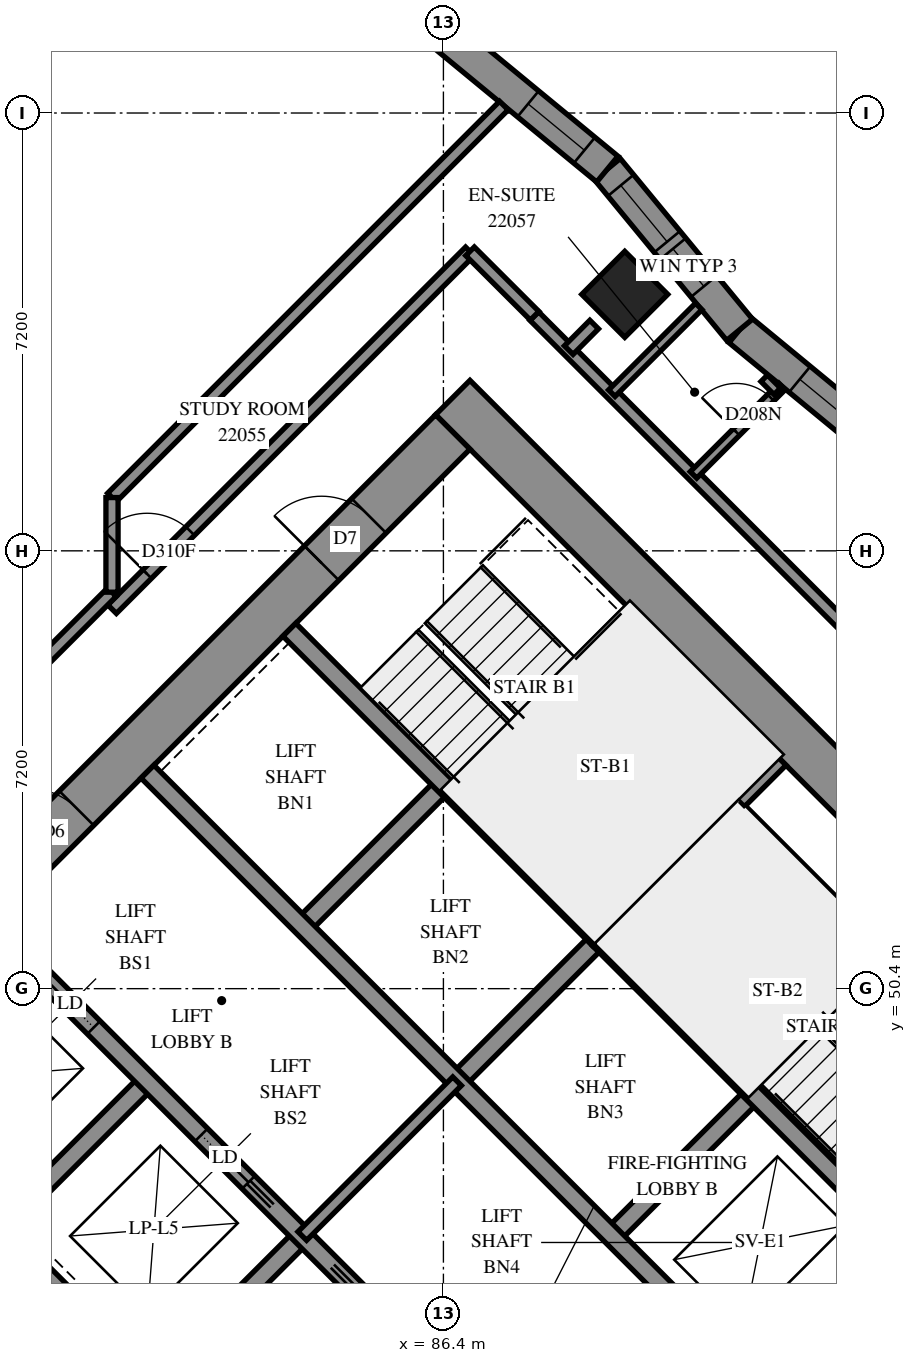
"""IFC4 building model, lengths in metres.
Left out: names, types, materials, properties, quantities, classifications, styles, units other than length and angle.
Written with IfcOpenShell. Run it as: python <this file> out.ifc"""

import sys

from ifc_helpers import new_model, si_unit, direction, frame, frame_2d, origin, origin_2d, place, context, subcontext, project, spatial, polyline, rectangle, outline, extrude, element, fill, save


model = new_model("IFC4")
c1 = context("Model", 3, precision=1e-05, world=origin(), true_north=direction((0.0, 1.0)))
c2 = subcontext(c1, "Body", "Model", "MODEL_VIEW")
j1 = project(units=[si_unit("LENGTHUNIT", "METRE"), si_unit("PLANEANGLEUNIT", "RADIAN")], contexts=[c1])
p1 = place(None, origin())
s1 = spatial("IfcSite", under=j1, at=p1, CompositionType="ELEMENT")
p2 = place(p1, origin())
s2 = spatial("IfcBuilding", under=s1, at=p2, CompositionType="ELEMENT")
p3 = place(p2, frame((0.0, 0.0, 84.6)))
s3 = spatial("IfcBuildingStorey", under=s2, at=p3, CompositionType="ELEMENT", Elevation=84.6)
p4 = place(p3, frame((89.382, 61.818, 0.0), z_axis=(0.0, 0.0, 1.0), x_axis=(0.7071067812, -0.7071067812, 0.0)))
e1 = element("IfcColumn", 1, at=p4, inside=s3, PredefinedType="COLUMN", context=c2, shape_type="SweptSolid", body=[
    extrude(rectangle(XDim=1.0, YDim=1.0, at=origin_2d()), origin(), (0.0, 0.0, 1.0), 3.1),
])
p5 = place(p3, frame((75.806, 49.373, -0.3), z_axis=(0.0, 0.0, 1.0), x_axis=(0.7071067812, -0.7071067812, 0.0)))
e2 = element("IfcWall", 2, at=p5, inside=s3, PredefinedType="SHEAR", context=c2, shape_type="SweptSolid", body=[
    extrude(rectangle(XDim=16.0, YDim=0.8, at=frame_2d((8.0, 0.0))), origin(), (0.0, 0.0, 1.0), 2.7),
])
p6 = place(p3, frame((86.554, 60.121, -0.3), z_axis=(0.0, 0.0, 1.0), x_axis=(0.7071067812, -0.7071067812, 0.0)))
e3 = element("IfcWall", 3, at=p6, inside=s3, PredefinedType="SHEAR", context=c2, shape_type="SweptSolid", body=[
    extrude(rectangle(XDim=16.0, YDim=0.8, at=frame_2d((8.0, 0.0))), origin(), (0.0, 0.0, 1.0), 2.7),
])
p7 = place(p6, frame((10.8, 0.0, 0.3)))
e4 = element("IfcOpeningElement", 4, at=p7, cuts=e3, PredefinedType="OPENING", context=c2, shape_type="SweptSolid", body=[
    extrude(rectangle(XDim=0.8, YDim=2.1, at=frame_2d((0.4, 1.05))), frame((0.0, 0.41, 0.0), z_axis=(0.0, -1.0, 0.0), x_axis=(1.0, 0.0, 0.0)), (0.0, 0.0, 1.0), 0.82),
])
p8 = place(p3, frame((76.372, 49.373, -0.3), z_axis=(0.0, 0.0, 1.0), x_axis=(0.7071067812, 0.7071067812, 0.0)))
e5 = element("IfcWall", 5, at=p8, inside=s3, PredefinedType="SHEAR", context=c2, shape_type="SweptSolid", body=[
    extrude(rectangle(XDim=14.4, YDim=0.8, at=frame_2d((7.2, 0.0))), origin(), (0.0, 0.0, 1.0), 2.7),
])
p9 = place(p8, frame((4.55, 0.0, 0.3)))
e6 = element("IfcOpeningElement", 6, at=p9, cuts=e5, PredefinedType="OPENING", context=c2, shape_type="SweptSolid", body=[
    extrude(rectangle(XDim=1.1, YDim=2.1, at=frame_2d((0.55, 1.05))), frame((0.0, 0.41, 0.0), z_axis=(0.0, -1.0, 0.0), x_axis=(1.0, 0.0, 0.0)), (0.0, 0.0, 1.0), 0.82),
])
p10 = place(p8, frame((11.35, 0.0, 0.3)))
e7 = element("IfcOpeningElement", 7, at=p10, cuts=e5, PredefinedType="OPENING", context=c2, shape_type="SweptSolid", body=[
    extrude(rectangle(XDim=1.1, YDim=2.1, at=frame_2d((0.55, 1.05))), frame((0.0, 0.41, 0.0), z_axis=(0.0, -1.0, 0.0), x_axis=(1.0, 0.0, 0.0)), (0.0, 0.0, 1.0), 0.82),
])
p11 = place(p3, frame((87.12, 38.625, -0.3), z_axis=(0.0, 0.0, 1.0), x_axis=(0.7071067812, 0.7071067812, 0.0)))
e8 = element("IfcWall", 8, at=p11, inside=s3, PredefinedType="SHEAR", context=c2, shape_type="SweptSolid", body=[
    extrude(rectangle(XDim=14.4, YDim=0.8, at=frame_2d((7.2, 0.0))), origin(), (0.0, 0.0, 1.0), 2.7),
])
p12 = place(p11, frame((4.55, 0.0, 0.3)))
e9 = element("IfcOpeningElement", 9, at=p12, cuts=e8, PredefinedType="OPENING", context=c2, shape_type="SweptSolid", body=[
    extrude(rectangle(XDim=1.1, YDim=2.1, at=frame_2d((0.55, 1.05))), frame((0.0, 0.41, 0.0), z_axis=(0.0, -1.0, 0.0), x_axis=(1.0, 0.0, 0.0)), (0.0, 0.0, 1.0), 0.82),
])
p13 = place(p11, frame((11.35, 0.0, 0.3)))
e10 = element("IfcOpeningElement", 10, at=p13, cuts=e8, PredefinedType="OPENING", context=c2, shape_type="SweptSolid", body=[
    extrude(rectangle(XDim=1.1, YDim=2.1, at=frame_2d((0.55, 1.05))), frame((0.0, 0.41, 0.0), z_axis=(0.0, -1.0, 0.0), x_axis=(1.0, 0.0, 0.0)), (0.0, 0.0, 1.0), 0.82),
])
for number, where, z_axis, x_axis in (
    (11, (79.2, 46.544, 0.0), (0.0, 0.0, 1.0), (0.707, 0.707, 0.0)),
    (12, (84.079, 51.423, 0.0), (0.0, 0.0, 1.0), (0.707, 0.707, 0.0)),
):
    element("IfcWall", number, at=place(p3, frame(where, z_axis=z_axis, x_axis=x_axis)), inside=s3, PredefinedType="SOLIDWALL", context=c2, shape_type="SweptSolid", body=[
        extrude(rectangle(XDim=3.3, YDim=0.3, at=frame_2d((1.65, 0.0))), origin(), (0.0, 0.0, 1.0), 3.1),
    ])
p14 = place(p3, frame((81.746, 43.999, 0.0), z_axis=(0.0, 0.0, 1.0), x_axis=(0.7071067812, 0.7071067812, 0.0)))
e13 = element("IfcWall", 13, at=p14, inside=s3, PredefinedType="SOLIDWALL", context=c2, shape_type="SweptSolid", body=[
    extrude(rectangle(XDim=3.3, YDim=0.3, at=frame_2d((1.65, 0.0))), origin(), (0.0, 0.0, 1.0), 3.1),
])
for number, where, z_axis, x_axis in (
    (14, (86.625, 48.878, 0.0), (0.0, 0.0, 1.0), (0.707, 0.707, 0.0)),
    (15, (89.17, 46.332, 0.0), (0.0, 0.0, 1.0), (0.707, 0.707, 0.0)),
):
    element("IfcWall", number, at=place(p3, frame(where, z_axis=z_axis, x_axis=x_axis)), inside=s3, PredefinedType="SOLIDWALL", context=c2, shape_type="SweptSolid", body=[
        extrude(rectangle(XDim=3.3, YDim=0.3, at=frame_2d((1.65, 0.0))), origin(), (0.0, 0.0, 1.0), 3.1),
    ])
p15 = place(p3, frame((78.988, 51.423, 0.0), z_axis=(0.0, 0.0, 1.0), x_axis=(0.7071067812, -0.7071067812, 0.0)))
e16 = element("IfcWall", 16, at=p15, inside=s3, PredefinedType="SOLIDWALL", context=c2, shape_type="SweptSolid", body=[
    extrude(rectangle(XDim=14.4, YDim=0.3, at=frame_2d((7.2, 0.0))), origin(), (0.0, 0.0, 1.0), 3.1),
])
p16 = place(p15, frame((1.25, 0.0, 0.0)))
e17 = element("IfcOpeningElement", 17, at=p16, cuts=e16, PredefinedType="OPENING", context=c2, shape_type="SweptSolid", body=[
    extrude(rectangle(XDim=1.1, YDim=2.1, at=frame_2d((0.55, 1.05))), frame((0.0, 0.16, 0.0), z_axis=(0.0, -1.0, 0.0), x_axis=(1.0, 0.0, 0.0)), (0.0, 0.0, 1.0), 0.32),
])
p17 = place(p15, frame((4.85, 0.0, 0.0)))
e18 = element("IfcOpeningElement", 18, at=p17, cuts=e16, PredefinedType="OPENING", context=c2, shape_type="SweptSolid", body=[
    extrude(rectangle(XDim=1.1, YDim=2.1, at=frame_2d((0.55, 1.05))), frame((0.0, 0.16, 0.0), z_axis=(0.0, -1.0, 0.0), x_axis=(1.0, 0.0, 0.0)), (0.0, 0.0, 1.0), 0.32),
])
p18 = place(p15, frame((8.45, 0.0, 0.0)))
e19 = element("IfcOpeningElement", 19, at=p18, cuts=e16, PredefinedType="OPENING", context=c2, shape_type="SweptSolid", body=[
    extrude(rectangle(XDim=1.1, YDim=2.1, at=frame_2d((0.55, 1.05))), frame((0.0, 0.16, 0.0), z_axis=(0.0, -1.0, 0.0), x_axis=(1.0, 0.0, 0.0)), (0.0, 0.0, 1.0), 0.32),
])
p19 = place(p15, frame((12.05, 0.0, 0.0)))
e20 = element("IfcOpeningElement", 20, at=p19, cuts=e16, PredefinedType="OPENING", context=c2, shape_type="SweptSolid", body=[
    extrude(rectangle(XDim=1.1, YDim=2.1, at=frame_2d((0.55, 1.05))), frame((0.0, 0.16, 0.0), z_axis=(0.0, -1.0, 0.0), x_axis=(1.0, 0.0, 0.0)), (0.0, 0.0, 1.0), 0.32),
])
p20 = place(p3, frame((81.534, 53.969, 0.0), z_axis=(0.0, 0.0, 1.0), x_axis=(0.707103309, -0.7071102534, 0.0)))
e21 = element("IfcWall", 21, at=p20, inside=s3, PredefinedType="SOLIDWALL", context=c2, shape_type="SweptSolid", body=[
    extrude(rectangle(XDim=14.4, YDim=0.3, at=frame_2d((7.2, 0.0))), origin(), (0.0, 0.0, 1.0), 3.1),
])
p21 = place(p20, frame((12.05, 0.0, 0.0)))
e22 = element("IfcOpeningElement", 22, at=p21, cuts=e21, PredefinedType="OPENING", context=c2, shape_type="SweptSolid", body=[
    extrude(rectangle(XDim=1.1, YDim=2.1, at=frame_2d((0.55, 1.05))), frame((0.0, 0.16, 0.0), z_axis=(0.0, -1.0, 0.0), x_axis=(1.0, 0.0, 0.0)), (0.0, 0.0, 1.0), 0.32),
])
for number, where, z_axis, x_axis in (
    (23, (83.867, 56.302, 0.0), (0.0, 0.0, 1.0), (0.707, -0.707, 0.0)),
    (24, (88.958, 51.211, 0.0), (0.0, 0.0, 1.0), (0.707, -0.707, 0.0)),
):
    element("IfcWall", number, at=place(p3, frame(where, z_axis=z_axis, x_axis=x_axis)), inside=s3, PredefinedType="SOLIDWALL", context=c2, shape_type="SweptSolid", body=[
        extrude(rectangle(XDim=7.2, YDim=0.3, at=frame_2d((3.6, 0.0))), origin(), (0.0, 0.0, 1.0), 3.1),
    ])
p22 = place(p3, frame((88.958, 51.211, 0.0), z_axis=(0.0, 0.0, 1.0), x_axis=(0.7071067812, 0.7071067812, 0.0)))
e25 = element("IfcWall", 25, at=p22, inside=s3, PredefinedType="SOLIDWALL", context=c2, shape_type="SweptSolid", body=[
    extrude(rectangle(XDim=4.2, YDim=0.3, at=frame_2d((2.1, 0.0))), origin(), (0.0, 0.0, 1.0), 3.1),
])
p23 = place(p3, frame((93.913, 59.06, 0.0), z_axis=(0.0, 0.0, 1.0), x_axis=(-0.7720044648, 0.6356171067, 0.0)))
e26 = element("IfcWall", 26, at=p23, inside=s3, PredefinedType="SOLIDWALL", context=c2, shape_type="SweptSolid", body=[
    extrude(outline(polyline([(-0.027, -0.275), (3.395, -0.275), (3.449, 0.275), (0.027, 0.275), (-0.027, -0.275)])), origin(), (0.0, 0.0, 1.0), 3.1),
])
p24 = place(p23, frame((0.941, 0.0, 0.5)))
e27 = element("IfcOpeningElement", 27, at=p24, cuts=e26, PredefinedType="OPENING", context=c2, shape_type="SweptSolid", body=[
    extrude(rectangle(XDim=1.2, YDim=2.45, at=frame_2d((0.6, 1.225))), frame((0.0, 0.285, 0.0), z_axis=(0.0, -1.0, 0.0), x_axis=(1.0, 0.0, 0.0)), (0.0, 0.0, 1.0), 0.57),
])
p25 = place(p3, frame((91.271, 61.235, 0.0), z_axis=(0.0, 0.0, 1.0), x_axis=(-0.6356171067, 0.7720044648, 0.0)))
e28 = element("IfcWall", 28, at=p25, inside=s3, PredefinedType="SOLIDWALL", context=c2, shape_type="SweptSolid", body=[
    extrude(outline(polyline([(0.027, -0.275), (3.449, -0.275), (3.395, 0.275), (-0.027, 0.275), (0.027, -0.275)])), origin(), (0.0, 0.0, 1.0), 3.1),
])
p26 = place(p25, frame((1.875, 0.0, 0.5)))
e29 = element("IfcOpeningElement", 29, at=p26, cuts=e28, PredefinedType="OPENING", context=c2, shape_type="SweptSolid", body=[
    extrude(rectangle(XDim=1.2, YDim=2.45, at=frame_2d((0.6, 1.225))), frame((0.0, 0.285, 0.0), z_axis=(0.0, -1.0, 0.0), x_axis=(1.0, 0.0, 0.0)), (0.0, 0.0, 1.0), 0.57),
])
p27 = place(p25, frame((0.925, 0.0, 0.45)))
e30 = element("IfcOpeningElement", 30, at=p27, cuts=e28, PredefinedType="OPENING", context=c2, shape_type="SweptSolid", body=[
    extrude(rectangle(XDim=0.8, YDim=2.5, at=frame_2d((0.4, 1.25))), frame((0.0, 0.285, 0.0), z_axis=(0.0, -1.0, 0.0), x_axis=(1.0, 0.0, 0.0)), (0.0, 0.0, 1.0), 0.57),
])
p28 = place(p3, frame((89.096, 63.877, 0.0), z_axis=(0.0, 0.0, 1.0), x_axis=(-0.7719926577, 0.635631447, 0.0)))
e31 = element("IfcWall", 31, at=p28, inside=s3, PredefinedType="SOLIDWALL", context=c2, shape_type="SweptSolid", body=[
    extrude(outline(polyline([(-0.027, -0.275), (3.395, -0.275), (3.449, 0.275), (0.027, 0.275), (-0.027, -0.275)])), origin(), (0.0, 0.0, 1.0), 3.1),
])
p29 = place(p28, frame((0.488, 0.0, 0.5)))
e32 = element("IfcOpeningElement", 32, at=p29, cuts=e31, PredefinedType="OPENING", context=c2, shape_type="SweptSolid", body=[
    extrude(rectangle(XDim=1.2, YDim=2.45, at=frame_2d((0.6, 1.225))), frame((0.0, 0.285, 0.0), z_axis=(0.0, -1.0, 0.0), x_axis=(1.0, 0.0, 0.0)), (0.0, 0.0, 1.0), 0.57),
])
p30 = place(p3, frame((91.313, 53.354, 0.0), z_axis=(0.0, 0.0, 1.0), x_axis=(0.7071140275, -0.7070995348, 0.0)))
e33 = element("IfcWall", 33, at=p30, inside=s3, PredefinedType="PARTITIONING", context=c2, shape_type="SweptSolid", body=[
    extrude(rectangle(XDim=6.9, YDim=0.15, at=frame_2d((3.45, 0.0))), origin(), (0.0, 0.0, 1.0), 3.1),
])
p31 = place(p3, frame((84.079, 46.332, 0.0), z_axis=(0.0, 0.0, 1.0), x_axis=(0.7071067812, 0.7071067812, 0.0)))
e34 = element("IfcWall", 34, at=p31, inside=s3, PredefinedType="PARTITIONING", context=c2, shape_type="SweptSolid", body=[
    extrude(rectangle(XDim=3.6, YDim=0.2, at=frame_2d((1.8, 0.0))), origin(), (0.0, 0.0, 1.0), 3.1),
])
p32 = place(p3, frame((87.894, 61.461, 0.0), z_axis=(0.0, 0.0, 1.0), x_axis=(0.7071067812, -0.7071067812, 0.0)))
e35 = element("IfcWall", 35, at=p32, inside=s3, PredefinedType="PARTITIONING", context=c2, shape_type="SweptSolid", body=[
    extrude(rectangle(XDim=17.5, YDim=0.2, at=frame_2d((8.75, 0.0))), origin(), (0.0, 0.0, 1.0), 3.1),
])
p33 = place(p32, frame((8.735, 0.0, 0.0)))
e36 = element("IfcOpeningElement", 36, at=p33, cuts=e35, PredefinedType="OPENING", context=c2, shape_type="SweptSolid", body=[
    extrude(rectangle(XDim=0.9, YDim=2.1, at=frame_2d((0.45, 1.05))), frame((0.0, 0.11, 0.0), z_axis=(0.0, -1.0, 0.0), x_axis=(1.0, 0.0, 0.0)), (0.0, 0.0, 1.0), 0.22),
])
p34 = place(p3, frame((80.949, 58.477, 0.0), z_axis=(0.0, 0.0, 1.0), x_axis=(0.7071122668, 0.7071012955, 0.0)))
e37 = element("IfcWall", 37, at=p34, inside=s3, PredefinedType="PARTITIONING", context=c2, shape_type="SweptSolid", body=[
    extrude(rectangle(XDim=9.115, YDim=0.2, at=frame_2d((4.557, 0.0))), origin(), (0.0, 0.0, 1.0), 3.1),
])
p35 = place(p3, frame((80.951, 56.641, 0.0), z_axis=(0.0, 0.0, 1.0), x_axis=(0.7071067812, 0.7071067812, 0.0)))
e38 = element("IfcWall", 38, at=p35, inside=s3, PredefinedType="PARTITIONING", context=c2, shape_type="SweptSolid", body=[
    extrude(rectangle(XDim=8.321, YDim=0.2, at=frame_2d((4.161, 0.0))), origin(), (0.0, 0.0, 1.0), 3.1),
])
p36 = place(p35, frame((0.816, 0.0, 0.0)))
e39 = element("IfcOpeningElement", 39, at=p36, cuts=e38, PredefinedType="OPENING", context=c2, shape_type="SweptSolid", body=[
    extrude(rectangle(XDim=1.0, YDim=2.1, at=frame_2d((0.5, 1.05))), frame((0.0, 0.11, 0.0), z_axis=(0.0, -1.0, 0.0), x_axis=(1.0, 0.0, 0.0)), (0.0, 0.0, 1.0), 0.22),
])
p37 = place(p3, frame((90.513, 58.849, 0.0), z_axis=(0.0, 0.0, 1.0), x_axis=(0.7071067812, 0.7071067812, 0.0)))
e40 = element("IfcWall", 40, at=p37, inside=s3, PredefinedType="PARTITIONING", context=c2, shape_type="SweptSolid", body=[
    extrude(rectangle(XDim=2.059, YDim=0.15, at=frame_2d((1.029, 0.0))), origin(), (0.0, 0.0, 1.0), 3.1),
])
p38 = place(p37, frame((0.996, 0.0, 0.0)))
e41 = element("IfcOpeningElement", 41, at=p38, cuts=e40, PredefinedType="OPENING", context=c2, shape_type="SweptSolid", body=[
    extrude(rectangle(XDim=0.8, YDim=2.1, at=frame_2d((0.4, 1.05))), frame((0.0, 0.085, 0.0), z_axis=(0.0, -1.0, 0.0), x_axis=(1.0, 0.0, 0.0)), (0.0, 0.0, 1.0), 0.17),
])
p39 = place(p3, frame((89.169, 60.193, 0.0), z_axis=(0.0, 0.0, 1.0), x_axis=(0.7076512613, 0.7065618815, 0.0)))
e42 = element("IfcWall", 42, at=p39, inside=s3, PredefinedType="PARTITIONING", context=c2, shape_type="SweptSolid", body=[
    extrude(rectangle(XDim=2.019, YDim=0.15, at=frame_2d((1.01, 0.0))), origin(), (0.0, 0.0, 1.0), 3.1),
])
p40 = place(p3, frame((79.801, 55.773, 0.0), z_axis=(0.0, 0.0, 1.0), x_axis=(0.7071067812, 0.7071067812, 0.0)))
e43 = element("IfcWall", 43, at=p40, inside=s3, PredefinedType="PARTITIONING", context=c2, shape_type="SweptSolid", body=[
    extrude(rectangle(XDim=1.623, YDim=0.2, at=frame_2d((0.812, 0.0))), origin(), (0.0, 0.0, 1.0), 3.1),
])
p41 = place(p3, frame((80.95, 56.92, 0.0), z_axis=(0.0, 0.0, 1.0), x_axis=(0.0, 1.0, 0.0)))
e44 = element("IfcWall", 44, at=p41, inside=s3, PredefinedType="PARTITIONING", context=c2, shape_type="SweptSolid", body=[
    extrude(rectangle(XDim=1.556, YDim=0.2, at=frame_2d((0.778, 0.0))), origin(), (0.0, 0.0, 1.0), 3.1),
])
p42 = place(p3, frame((86.838, 62.526, 0.0), z_axis=(0.0, 0.0, 1.0), x_axis=(0.70777292, -0.7064400143, 0.0)))
e45 = element("IfcWall", 45, at=p42, inside=s3, PredefinedType="PARTITIONING", context=c2, shape_type="SweptSolid", body=[
    extrude(rectangle(XDim=1.5, YDim=0.2, at=frame_2d((0.75, 0.0))), origin(), (0.0, 0.0, 1.0), 3.1),
])
p43 = place(p3, frame((88.461, 60.901, 0.0), z_axis=(0.0, 0.0, 1.0), x_axis=(0.7054171665, 0.7087923682, 0.0)))
e46 = element("IfcWall", 46, at=p43, inside=s3, PredefinedType="PARTITIONING", context=c2, shape_type="SweptSolid", body=[
    extrude(rectangle(XDim=0.593, YDim=0.2, at=frame_2d((0.296, 0.0))), origin(), (0.0, 0.0, 1.0), 3.1),
])
p44 = place(p3, frame((91.675, 60.437, 0.0), z_axis=(0.0, 0.0, 1.0), x_axis=(0.7071067812, -0.7071067812, 0.0)))
e47 = element("IfcWall", 47, at=p44, inside=s3, PredefinedType="PARTITIONING", context=c2, shape_type="SweptSolid", body=[
    extrude(rectangle(XDim=0.303, YDim=0.15, at=frame_2d((0.151, 0.0))), origin(), (0.0, 0.0, 1.0), 3.1),
])
p45 = place(p24, origin())
e48 = element("IfcWindow", 48, at=p45, inside=s3, PartitioningType="SINGLE_PANEL", PredefinedType="WINDOW", context=c2, shape_type="SweptSolid", body=[
    extrude(rectangle(XDim=1.2, YDim=2.45, at=frame_2d((0.6, 1.225))), frame((0.0, 0.155, 0.0), z_axis=(0.0, -1.0, 0.0), x_axis=(1.0, 0.0, 0.0)), (0.0, 0.0, 1.0), 0.06),
])
fill(e27, e48)
p46 = place(p26, origin())
e49 = element("IfcWindow", 49, at=p46, inside=s3, PartitioningType="SINGLE_PANEL", PredefinedType="WINDOW", context=c2, shape_type="SweptSolid", body=[
    extrude(rectangle(XDim=1.2, YDim=2.45, at=frame_2d((0.6, 1.225))), frame((0.0, 0.155, 0.0), z_axis=(0.0, -1.0, 0.0), x_axis=(1.0, 0.0, 0.0)), (0.0, 0.0, 1.0), 0.06),
])
fill(e29, e49)
p47 = place(p29, origin())
e50 = element("IfcWindow", 50, at=p47, inside=s3, PartitioningType="SINGLE_PANEL", PredefinedType="WINDOW", context=c2, shape_type="SweptSolid", body=[
    extrude(rectangle(XDim=1.2, YDim=2.45, at=frame_2d((0.6, 1.225))), frame((0.0, 0.155, 0.0), z_axis=(0.0, -1.0, 0.0), x_axis=(1.0, 0.0, 0.0)), (0.0, 0.0, 1.0), 0.06),
])
fill(e32, e50)
p48 = place(p9, origin())
e51 = element("IfcDoor", 51, at=p48, inside=s3, OperationType="DOUBLE_DOOR_SINGLE_SWING", PredefinedType="DOOR", context=c2, shape_type="SweptSolid", body=[
    extrude(rectangle(XDim=1.1, YDim=2.1, at=frame_2d((0.55, 1.05))), frame((0.0, 0.025, 0.0), z_axis=(0.0, -1.0, 0.0), x_axis=(1.0, 0.0, 0.0)), (0.0, 0.0, 1.0), 0.05),
])
fill(e6, e51)
p49 = place(p10, origin())
e52 = element("IfcDoor", 52, at=p49, inside=s3, OperationType="SINGLE_SWING_LEFT", PredefinedType="DOOR", context=c2, shape_type="SweptSolid", body=[
    extrude(rectangle(XDim=1.1, YDim=2.1, at=frame_2d((0.55, 1.05))), frame((0.0, 0.025, 0.0), z_axis=(0.0, -1.0, 0.0), x_axis=(1.0, 0.0, 0.0)), (0.0, 0.0, 1.0), 0.05),
])
fill(e7, e52)
p50 = place(p16, origin())
e53 = element("IfcDoor", 53, at=p50, inside=s3, OperationType="SLIDING_TO_LEFT", PredefinedType="DOOR", context=c2, shape_type="SweptSolid", body=[
    extrude(rectangle(XDim=1.1, YDim=2.1, at=frame_2d((0.55, 1.05))), frame((0.0, 0.025, 0.0), z_axis=(0.0, -1.0, 0.0), x_axis=(1.0, 0.0, 0.0)), (0.0, 0.0, 1.0), 0.05),
])
fill(e17, e53)
p51 = place(p17, origin())
e54 = element("IfcDoor", 54, at=p51, inside=s3, OperationType="SLIDING_TO_RIGHT", PredefinedType="DOOR", context=c2, shape_type="SweptSolid", body=[
    extrude(rectangle(XDim=1.1, YDim=2.1, at=frame_2d((0.55, 1.05))), frame((0.0, 0.025, 0.0), z_axis=(0.0, -1.0, 0.0), x_axis=(1.0, 0.0, 0.0)), (0.0, 0.0, 1.0), 0.05),
])
fill(e18, e54)
p52 = place(p36, origin())
e55 = element("IfcDoor", 55, at=p52, inside=s3, OperationType="SINGLE_SWING_RIGHT", PredefinedType="DOOR", context=c2, shape_type="SweptSolid", body=[
    extrude(rectangle(XDim=1.0, YDim=2.1, at=frame_2d((0.5, 1.05))), frame((0.0, 0.025, 0.0), z_axis=(0.0, -1.0, 0.0), x_axis=(1.0, 0.0, 0.0)), (0.0, 0.0, 1.0), 0.05),
])
fill(e39, e55)
p53 = place(p38, origin())
e56 = element("IfcDoor", 56, at=p53, inside=s3, OperationType="SINGLE_SWING_RIGHT", PredefinedType="DOOR", context=c2, shape_type="SweptSolid", body=[
    extrude(rectangle(XDim=0.8, YDim=2.1, at=frame_2d((0.4, 1.05))), frame((0.0, 0.025, 0.0), z_axis=(0.0, -1.0, 0.0), x_axis=(1.0, 0.0, 0.0)), (0.0, 0.0, 1.0), 0.05),
])
fill(e41, e56)
p54 = place(p27, origin())
e57 = element("IfcWindow", 57, at=p54, inside=s3, PartitioningType="SINGLE_PANEL", PredefinedType="WINDOW", context=c2, shape_type="SweptSolid", body=[
    extrude(rectangle(XDim=0.8, YDim=2.5, at=frame_2d((0.4, 1.25))), frame((0.0, 0.155, 0.0), z_axis=(0.0, -1.0, 0.0), x_axis=(1.0, 0.0, 0.0)), (0.0, 0.0, 1.0), 0.06),
])
fill(e30, e57)
save(model, sys.argv[1])
